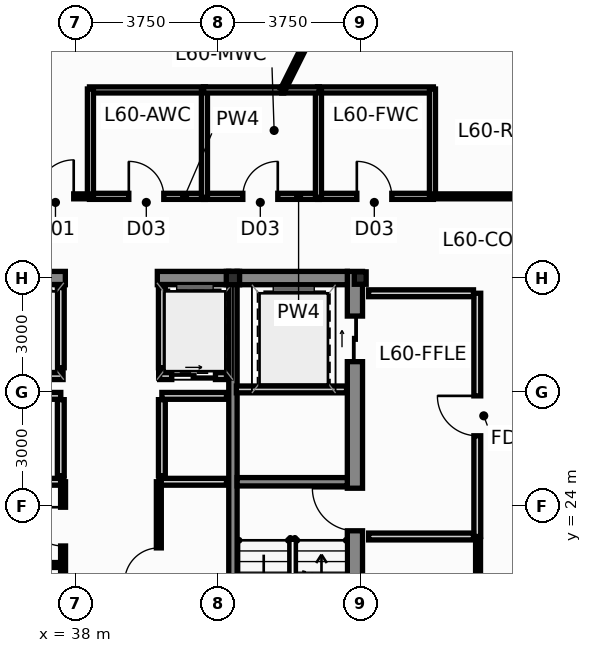
"""IFC4 building model, lengths in metres.
Left out: names, types, materials, properties, quantities, classifications, styles, units other than length and angle.
Written with IfcOpenShell. Run it as: python <this file> out.ifc"""

import sys

from ifc_helpers import new_model, si_unit, direction, frame, frame_2d, origin, origin_2d, place, context, subcontext, project, spatial, rectangle, hollow_rectangle, i_section, extrude, source, transform, mapped, element, fill, save


model = new_model("IFC4")
c1 = context("Model", 3, precision=1e-05, world=origin(), true_north=direction((0.0, 1.0)))
c2 = subcontext(c1, "Body", "Model", "MODEL_VIEW")
j1 = project(units=[si_unit("LENGTHUNIT", "METRE"), si_unit("PLANEANGLEUNIT", "RADIAN")], contexts=[c1])
p1 = place(None, origin())
s1 = spatial("IfcSite", under=j1, at=p1, CompositionType="ELEMENT")
p2 = place(p1, origin())
s2 = spatial("IfcBuilding", under=s1, at=p2, CompositionType="ELEMENT")
p3 = place(p2, frame((0.0, 0.0, 229.85)))
s3 = spatial("IfcBuildingStorey", under=s2, at=p3, CompositionType="ELEMENT", Elevation=229.85)
m1 = source(origin(), c2, "Body", "SweptSolid", [
    extrude(i_section(OverallWidth=0.311, OverallDepth=0.327, WebThickness=0.016, FlangeThickness=0.025, at=origin_2d()), origin(), (0.0, 0.0, 1.0), 3.65),
])
p4 = place(p3, frame((45.5, 30.0, 0.0), z_axis=(0.0, 0.0, 1.0), x_axis=(1.0, 0.0, 0.0)))
e1 = element("IfcColumn", 1, at=p4, inside=s3, PredefinedType="COLUMN", context=c2, shape_type="MappedRepresentation", body=[
    mapped(m1, transform((0.0, 0.0, 0.0), scale=1.0)),
])
m2 = source(origin(), c2, "Body", "SweptSolid", [
    extrude(hollow_rectangle(XDim=0.35, YDim=0.35, WallThickness=0.016, at=origin_2d()), origin(), (0.0, 0.0, 1.0), 3.65),
])
p5 = place(p3, frame((42.15, 30.0, 0.0), z_axis=(0.0, 0.0, 1.0), x_axis=(1.0, 0.0, 0.0)))
e2 = element("IfcColumn", 2, at=p5, inside=s3, PredefinedType="COLUMN", context=c2, shape_type="MappedRepresentation", body=[
    mapped(m2, transform((0.0, 0.0, 0.0), scale=1.0)),
])
p6 = place(p3, frame((45.36, 17.05, 0.0), z_axis=(0.0, 0.0, 1.0), x_axis=(0.0, 1.0, 0.0)))
e3 = element("IfcWall", 3, at=p6, inside=s3, PredefinedType="SHEAR", context=c2, shape_type="SweptSolid", body=[
    extrude(rectangle(XDim=13.125, YDim=0.4, at=frame_2d((6.562, 0.0))), origin(), (0.0, 0.0, 1.0), 3.65),
])
p7 = place(p6, frame((6.3, 0.0, 0.0)))
e4 = element("IfcOpeningElement", 4, at=p7, cuts=e3, PredefinedType="OPENING", context=c2, shape_type="SweptSolid", body=[
    extrude(rectangle(XDim=1.12, YDim=2.15, at=frame_2d((0.56, 1.075))), frame((0.0, 0.212, 0.0), z_axis=(0.0, -1.0, 0.0), x_axis=(1.0, 0.0, 0.0)), (0.0, 0.0, 1.0), 0.424),
])
p8 = place(p6, frame((10.75, 0.0, 0.0)))
e5 = element("IfcOpeningElement", 5, at=p8, cuts=e3, PredefinedType="OPENING", context=c2, shape_type="SweptSolid", body=[
    extrude(rectangle(XDim=1.2, YDim=2.2, at=frame_2d((0.6, 1.1))), frame((0.0, 0.212, 0.0), z_axis=(0.0, -1.0, 0.0), x_axis=(1.0, 0.0, 0.0)), (0.0, 0.0, 1.0), 0.424),
])
p9 = place(p3, frame((33.96, 30.0, 0.0), z_axis=(0.0, 0.0, 1.0), x_axis=(1.0, 0.0, 0.0)))
e6 = element("IfcWall", 6, at=p9, inside=s3, PredefinedType="SHEAR", context=c2, shape_type="SweptSolid", body=[
    extrude(rectangle(XDim=3.78, YDim=0.35, at=frame_2d((1.89, 0.0))), origin(), (0.0, 0.0, 1.0), 3.65),
])
p10 = place(p3, frame((40.16, 30.0, 0.0), z_axis=(0.0, 0.0, 1.0), x_axis=(1.0, 0.0, 0.0)))
e7 = element("IfcWall", 7, at=p10, inside=s3, PredefinedType="SHEAR", context=c2, shape_type="SweptSolid", body=[
    extrude(rectangle(XDim=1.88, YDim=0.35, at=frame_2d((0.94, 0.0))), origin(), (0.0, 0.0, 1.0), 3.65),
])
p11 = place(p3, frame((42.26, 30.0, 0.0), z_axis=(0.0, 0.0, 1.0), x_axis=(1.0, 0.0, 0.0)))
e8 = element("IfcWall", 8, at=p11, inside=s3, PredefinedType="SHEAR", context=c2, shape_type="SweptSolid", body=[
    extrude(rectangle(XDim=2.9, YDim=0.35, at=frame_2d((1.45, 0.0))), origin(), (0.0, 0.0, 1.0), 3.65),
])
p12 = place(p3, frame((42.15, 17.05, 0.0), z_axis=(0.0, 0.0, 1.0), x_axis=(0.0, 1.0, 0.0)))
e9 = element("IfcWall", 9, at=p12, inside=s3, PredefinedType="SHEAR", context=c2, shape_type="SweptSolid", body=[
    extrude(rectangle(XDim=13.125, YDim=0.22, at=frame_2d((6.562, 0.0))), origin(), (0.0, 0.0, 1.0), 3.65),
])
p13 = place(p3, frame((42.26, 24.64, 0.0), z_axis=(0.0, 0.0, 1.0), x_axis=(1.0, 0.0, 0.0)))
e10 = element("IfcWall", 10, at=p13, inside=s3, PredefinedType="SHEAR", context=c2, shape_type="SweptSolid", body=[
    extrude(rectangle(XDim=2.9, YDim=0.22, at=frame_2d((1.45, 0.0))), origin(), (0.0, 0.0, 1.0), 3.65),
])
p14 = place(p3, frame((34.02, 26.9, 0.0), z_axis=(0.0, 0.0, 1.0), x_axis=(1.0, 0.0, 0.0)))
e11 = element("IfcWall", 11, at=p14, inside=s3, PredefinedType="PARTITIONING", context=c2, shape_type="SweptSolid", body=[
    extrude(rectangle(XDim=3.6, YDim=0.18, at=frame_2d((1.8, 0.0))), origin(), (0.0, 0.0, 1.0), 3.4),
])
p15 = place(p3, frame((40.28, 26.9, 0.0), z_axis=(0.0, 0.0, 1.0), x_axis=(1.0, 0.0, 0.0)))
e12 = element("IfcWall", 12, at=p15, inside=s3, PredefinedType="PARTITIONING", context=c2, shape_type="SweptSolid", body=[
    extrude(rectangle(XDim=1.7, YDim=0.18, at=frame_2d((0.85, 0.0))), origin(), (0.0, 0.0, 1.0), 3.4),
])
for number, where, z_axis, x_axis in (
    (13, (37.62, 24.8, 0.0), (0.0, 0.0, 1.0), (0.0, 1.0, 0.0)),
    (14, (40.28, 24.8, 0.0), (0.0, 0.0, 1.0), (0.0, 1.0, 0.0)),
):
    element("IfcWall", number, at=place(p3, frame(where, z_axis=z_axis, x_axis=x_axis)), inside=s3, PredefinedType="PARTITIONING", context=c2, shape_type="SweptSolid", body=[
        extrude(rectangle(XDim=2.0, YDim=0.18, at=frame_2d((1.0, 0.0))), origin(), (0.0, 0.0, 1.0), 3.4),
    ])
p16 = place(p3, frame((34.02, 24.64, 0.0), z_axis=(0.0, 0.0, 1.0), x_axis=(1.0, 0.0, 0.0)))
e15 = element("IfcWall", 15, at=p16, inside=s3, PredefinedType="PARTITIONING", context=c2, shape_type="SweptSolid", body=[
    extrude(rectangle(XDim=3.68, YDim=0.18, at=frame_2d((1.84, 0.0))), origin(), (0.0, 0.0, 1.0), 3.4),
])
p17 = place(p3, frame((40.2, 24.64, 0.0), z_axis=(0.0, 0.0, 1.0), x_axis=(1.0, 0.0, 0.0)))
e16 = element("IfcWall", 16, at=p17, inside=s3, PredefinedType="PARTITIONING", context=c2, shape_type="SweptSolid", body=[
    extrude(rectangle(XDim=1.78, YDim=0.18, at=frame_2d((0.89, 0.0))), origin(), (0.0, 0.0, 1.0), 3.4),
])
p18 = place(p3, frame((34.02, 27.42, 0.0), z_axis=(0.0, 0.0, 1.0), x_axis=(1.0, 0.0, 0.0)))
e17 = element("IfcWall", 17, at=p18, inside=s3, PredefinedType="PARTITIONING", context=c2, shape_type="SweptSolid", body=[
    extrude(rectangle(XDim=3.66, YDim=0.18, at=frame_2d((1.83, 0.0))), origin(), (0.0, 0.0, 1.0), 3.4),
])
p19 = place(p18, frame((0.3, 0.0, 0.0)))
e18 = element("IfcOpeningElement", 18, at=p19, cuts=e17, PredefinedType="OPENING", context=c2, shape_type="SweptSolid", body=[
    extrude(rectangle(XDim=1.15, YDim=2.2, at=frame_2d((0.575, 1.1))), frame((0.0, 0.102, 0.0), z_axis=(0.0, -1.0, 0.0), x_axis=(1.0, 0.0, 0.0)), (0.0, 0.0, 1.0), 0.204),
])
p20 = place(p18, frame((2.1, 0.0, 0.0)))
e19 = element("IfcOpeningElement", 19, at=p20, cuts=e17, PredefinedType="OPENING", context=c2, shape_type="SweptSolid", body=[
    extrude(rectangle(XDim=1.15, YDim=2.2, at=frame_2d((0.575, 1.1))), frame((0.0, 0.102, 0.0), z_axis=(0.0, -1.0, 0.0), x_axis=(1.0, 0.0, 0.0)), (0.0, 0.0, 1.0), 0.204),
])
p21 = place(p3, frame((40.22, 27.42, 0.0), z_axis=(0.0, 0.0, 1.0), x_axis=(1.0, 0.0, 0.0)))
e20 = element("IfcWall", 20, at=p21, inside=s3, PredefinedType="PARTITIONING", context=c2, shape_type="SweptSolid", body=[
    extrude(rectangle(XDim=1.76, YDim=0.18, at=frame_2d((0.88, 0.0))), origin(), (0.0, 0.0, 1.0), 3.4),
])
p22 = place(p21, frame((0.32, 0.0, 0.0)))
e21 = element("IfcOpeningElement", 21, at=p22, cuts=e20, PredefinedType="OPENING", context=c2, shape_type="SweptSolid", body=[
    extrude(rectangle(XDim=1.15, YDim=2.2, at=frame_2d((0.575, 1.1))), frame((0.0, 0.102, 0.0), z_axis=(0.0, -1.0, 0.0), x_axis=(1.0, 0.0, 0.0)), (0.0, 0.0, 1.0), 0.204),
])
for number, where, z_axis, x_axis in (
    (22, (37.62, 27.64, 0.0), (0.0, 0.0, 1.0), (0.0, 1.0, 0.0)),
    (23, (40.28, 27.64, 0.0), (0.0, 0.0, 1.0), (0.0, 1.0, 0.0)),
):
    element("IfcWall", number, at=place(p3, frame(where, z_axis=z_axis, x_axis=x_axis)), inside=s3, PredefinedType="PARTITIONING", context=c2, shape_type="SweptSolid", body=[
        extrude(rectangle(XDim=2.11, YDim=0.18, at=frame_2d((1.055, 0.0))), origin(), (0.0, 0.0, 1.0), 3.4),
    ])
p23 = place(p3, frame((48.58, 23.2, 0.0), z_axis=(0.0, 0.0, 1.0), x_axis=(0.0, 1.0, 0.0)))
e24 = element("IfcWall", 24, at=p23, inside=s3, PredefinedType="PARTITIONING", context=c2, shape_type="SweptSolid", body=[
    extrude(rectangle(XDim=6.4, YDim=0.18, at=frame_2d((3.2, 0.0))), origin(), (0.0, 0.0, 1.0), 3.129),
])
p24 = place(p23, frame((2.65, 0.0, 0.0)))
e25 = element("IfcOpeningElement", 25, at=p24, cuts=e24, PredefinedType="OPENING", context=c2, shape_type="SweptSolid", body=[
    extrude(rectangle(XDim=1.05, YDim=2.15, at=frame_2d((0.525, 1.075))), frame((0.0, 0.102, 0.0), z_axis=(0.0, -1.0, 0.0), x_axis=(1.0, 0.0, 0.0)), (0.0, 0.0, 1.0), 0.204),
])
p25 = place(p3, frame((45.72, 23.2, 0.0), z_axis=(0.0, 0.0, 1.0), x_axis=(1.0, 0.0, 0.0)))
e26 = element("IfcWall", 26, at=p25, inside=s3, PredefinedType="PARTITIONING", context=c2, shape_type="SweptSolid", body=[
    extrude(rectangle(XDim=2.76, YDim=0.18, at=frame_2d((1.38, 0.0))), origin(), (0.0, 0.0, 1.0), 3.4),
])
p26 = place(p3, frame((45.72, 29.6, 0.0), z_axis=(0.0, 0.0, 1.0), x_axis=(1.0, 0.0, 0.0)))
e27 = element("IfcWall", 27, at=p26, inside=s3, PredefinedType="PARTITIONING", context=c2, shape_type="SweptSolid", body=[
    extrude(rectangle(XDim=2.76, YDim=0.18, at=frame_2d((1.38, 0.0))), origin(), (0.0, 0.0, 1.0), 2.985),
])
p27 = place(p3, frame((42.24, 27.07, 0.0), z_axis=(0.0, 0.0, 1.0), x_axis=(1.0, 0.0, 0.0)))
e28 = element("IfcWall", 28, at=p27, inside=s3, PredefinedType="PARTITIONING", context=c2, shape_type="SweptSolid", body=[
    extrude(rectangle(XDim=2.9, YDim=0.18, at=frame_2d((1.45, 0.0))), origin(), (0.0, 0.0, 1.0), 3.4),
])
p28 = place(p3, frame((34.02, 22.45, 0.0), z_axis=(0.0, 0.0, 1.0), x_axis=(1.0, 0.0, 0.0)))
e29 = element("IfcWall", 29, at=p28, inside=s3, PredefinedType="PARTITIONING", context=c2, shape_type="SweptSolid", body=[
    extrude(rectangle(XDim=3.58, YDim=0.13, at=frame_2d((1.79, 0.0))), origin(), (0.0, 0.0, 1.0), 3.4),
])
p29 = place(p3, frame((37.68, 20.5, 0.0), z_axis=(0.0, 0.0, 1.0), x_axis=(0.0, 1.0, 0.0)))
e30 = element("IfcWall", 30, at=p29, inside=s3, PredefinedType="PARTITIONING", context=c2, shape_type="SweptSolid", body=[
    extrude(rectangle(XDim=4.14, YDim=0.13, at=frame_2d((2.07, 0.0))), origin(), (0.0, 0.0, 1.0), 3.4),
])
p30 = place(p29, frame((0.42, 0.0, 0.0)))
e31 = element("IfcOpeningElement", 31, at=p30, cuts=e30, PredefinedType="OPENING", context=c2, shape_type="SweptSolid", body=[
    extrude(rectangle(XDim=0.9, YDim=2.1, at=frame_2d((0.45, 1.05))), frame((0.0, 0.077, 0.0), z_axis=(0.0, -1.0, 0.0), x_axis=(1.0, 0.0, 0.0)), (0.0, 0.0, 1.0), 0.154),
])
p31 = place(p29, frame((2.45, 0.0, 0.0)))
e32 = element("IfcOpeningElement", 32, at=p31, cuts=e30, PredefinedType="OPENING", context=c2, shape_type="SweptSolid", body=[
    extrude(rectangle(XDim=1.02, YDim=2.15, at=frame_2d((0.51, 1.075))), frame((0.0, 0.077, 0.0), z_axis=(0.0, -1.0, 0.0), x_axis=(1.0, 0.0, 0.0)), (0.0, 0.0, 1.0), 0.154),
])
p32 = place(p3, frame((40.2, 20.5, 0.0), z_axis=(0.0, 0.0, 1.0), x_axis=(0.0, 1.0, 0.0)))
e33 = element("IfcWall", 33, at=p32, inside=s3, PredefinedType="PARTITIONING", context=c2, shape_type="SweptSolid", body=[
    extrude(rectangle(XDim=4.14, YDim=0.13, at=frame_2d((2.07, 0.0))), origin(), (0.0, 0.0, 1.0), 3.4),
])
p33 = place(p32, frame((1.5, 0.0, 0.0)))
e34 = element("IfcOpeningElement", 34, at=p33, cuts=e33, PredefinedType="OPENING", context=c2, shape_type="SweptSolid", body=[
    extrude(rectangle(XDim=0.9, YDim=2.1, at=frame_2d((0.45, 1.05))), frame((0.0, 0.077, 0.0), z_axis=(0.0, -1.0, 0.0), x_axis=(1.0, 0.0, 0.0)), (0.0, 0.0, 1.0), 0.154),
])
p34 = place(p3, frame((38.375, 32.15, 0.0), z_axis=(0.0, 0.0, 1.0), x_axis=(1.0, 0.0, 0.0)))
e35 = element("IfcWall", 35, at=p34, inside=s3, PredefinedType="PLUMBINGWALL", context=c2, shape_type="SweptSolid", body=[
    extrude(rectangle(XDim=3.05, YDim=0.16, at=frame_2d((1.525, 0.0))), origin(), (0.0, 0.0, 1.0), 3.4),
])
p35 = place(p34, frame((1.035, 0.0, 0.0)))
e36 = element("IfcOpeningElement", 36, at=p35, cuts=e35, PredefinedType="OPENING", context=c2, shape_type="SweptSolid", body=[
    extrude(rectangle(XDim=0.92, YDim=2.1, at=frame_2d((0.46, 1.05))), frame((0.0, 0.092, 0.0), z_axis=(0.0, -1.0, 0.0), x_axis=(1.0, 0.0, 0.0)), (0.0, 0.0, 1.0), 0.184),
])
p36 = place(p3, frame((41.375, 32.15, 0.0), z_axis=(0.0, 0.0, 1.0), x_axis=(1.0, 0.0, 0.0)))
e37 = element("IfcWall", 37, at=p36, inside=s3, PredefinedType="PLUMBINGWALL", context=c2, shape_type="SweptSolid", body=[
    extrude(rectangle(XDim=3.05, YDim=0.16, at=frame_2d((1.525, 0.0))), origin(), (0.0, 0.0, 1.0), 3.4),
])
p37 = place(p36, frame((1.035, 0.0, 0.0)))
e38 = element("IfcOpeningElement", 38, at=p37, cuts=e37, PredefinedType="OPENING", context=c2, shape_type="SweptSolid", body=[
    extrude(rectangle(XDim=0.92, YDim=2.1, at=frame_2d((0.46, 1.05))), frame((0.0, 0.092, 0.0), z_axis=(0.0, -1.0, 0.0), x_axis=(1.0, 0.0, 0.0)), (0.0, 0.0, 1.0), 0.184),
])
p38 = place(p3, frame((44.375, 32.15, 0.0), z_axis=(0.0, 0.0, 1.0), x_axis=(1.0, 0.0, 0.0)))
e39 = element("IfcWall", 39, at=p38, inside=s3, PredefinedType="PLUMBINGWALL", context=c2, shape_type="SweptSolid", body=[
    extrude(rectangle(XDim=3.05, YDim=0.16, at=frame_2d((1.525, 0.0))), origin(), (0.0, 0.0, 1.0), 3.4),
])
p39 = place(p38, frame((1.035, 0.0, 0.0)))
e40 = element("IfcOpeningElement", 40, at=p39, cuts=e39, PredefinedType="OPENING", context=c2, shape_type="SweptSolid", body=[
    extrude(rectangle(XDim=0.92, YDim=2.1, at=frame_2d((0.46, 1.05))), frame((0.0, 0.092, 0.0), z_axis=(0.0, -1.0, 0.0), x_axis=(1.0, 0.0, 0.0)), (0.0, 0.0, 1.0), 0.184),
])
for number, where, z_axis, x_axis in (
    (41, (38.375, 34.95, 0.0), (0.0, 0.0, 1.0), (1.0, 0.0, 0.0)),
    (42, (47.425, 34.95, 0.0), (0.0, 0.0, 1.0), (-1.0, 0.0, 0.0)),
):
    element("IfcWall", number, at=place(p3, frame(where, z_axis=z_axis, x_axis=x_axis)), inside=s3, PredefinedType="PLUMBINGWALL", context=c2, shape_type="SweptSolid", body=[
        extrude(rectangle(XDim=3.05, YDim=0.16, at=frame_2d((1.525, 0.0))), origin(), (0.0, 0.0, 1.0), 3.4),
    ])
for number, where, z_axis, x_axis in (
    (43, (41.4, 32.125, 0.0), (0.0, 0.0, 1.0), (0.0, 1.0, 0.0)),
    (44, (38.4, 32.125, 0.0), (0.0, 0.0, 1.0), (0.0, 1.0, 0.0)),
):
    element("IfcWall", number, at=place(p3, frame(where, z_axis=z_axis, x_axis=x_axis)), inside=s3, PredefinedType="PLUMBINGWALL", context=c2, shape_type="SweptSolid", body=[
        extrude(rectangle(XDim=2.85, YDim=0.16, at=frame_2d((1.425, 0.0))), origin(), (0.0, 0.0, 1.0), 3.4),
    ])
for number, where, z_axis, x_axis in (
    (45, (44.4, 32.125, 0.0), (0.0, 0.0, 1.0), (0.0, 1.0, 0.0)),
    (46, (47.4, 32.125, 0.0), (0.0, 0.0, 1.0), (0.0, 1.0, 0.0)),
):
    element("IfcWall", number, at=place(p3, frame(where, z_axis=z_axis, x_axis=x_axis)), inside=s3, PredefinedType="PLUMBINGWALL", context=c2, shape_type="SweptSolid", body=[
        extrude(rectangle(XDim=2.85, YDim=0.16, at=frame_2d((1.425, 0.0))), origin(), (0.0, 0.0, 1.0), 2.985),
    ])
p40 = place(p3, frame((41.375, 34.95, 0.0), z_axis=(0.0, 0.0, 1.0), x_axis=(1.0, 0.0, 0.0)))
e47 = element("IfcWall", 47, at=p40, inside=s3, PredefinedType="PLUMBINGWALL", context=c2, shape_type="SweptSolid", body=[
    extrude(rectangle(XDim=2.11, YDim=0.16, at=frame_2d((1.055, 0.0))), origin(), (0.0, 0.0, 1.0), 3.4),
])
p41 = place(p3, frame((43.435, 34.95, 0.0), z_axis=(0.0, 0.0, 1.0), x_axis=(1.0, 0.0, 0.0)))
e48 = element("IfcWall", 48, at=p41, inside=s3, PredefinedType="PLUMBINGWALL", context=c2, shape_type="SweptSolid", body=[
    extrude(rectangle(XDim=0.99, YDim=0.16, at=frame_2d((0.495, 0.0))), origin(), (0.0, 0.0, 1.0), 3.4),
])
p42 = place(p3, frame((43.462, 34.954, 0.0), z_axis=(0.0, 0.0, 1.0), x_axis=(0.446662598545, 0.894702477398, 0.0)))
e49 = element("IfcWall", 49, at=p42, inside=s3, PredefinedType="PARTITIONING", context=c2, shape_type="SweptSolid", body=[
    extrude(rectangle(XDim=6.913, YDim=0.13, at=frame_2d((3.457, 0.0))), origin(), (0.0, 0.0, 1.0), 3.4),
])
p43 = place(p3, frame((48.6, 17.105, 0.0), z_axis=(0.0, 0.0, 1.0), x_axis=(0.0, 1.0, 0.0)))
e50 = element("IfcWall", 50, at=p43, inside=s3, PredefinedType="PARTITIONING", context=c2, shape_type="SweptSolid", body=[
    extrude(rectangle(XDim=6.0, YDim=0.13, at=frame_2d((3.0, 0.0))), origin(), (0.0, 0.0, 1.0), 3.4),
])
p44 = place(p43, frame((2.52, 0.0, 0.0)))
e51 = element("IfcOpeningElement", 51, at=p44, cuts=e50, PredefinedType="OPENING", context=c2, shape_type="SweptSolid", body=[
    extrude(rectangle(XDim=0.96, YDim=2.15, at=frame_2d((0.48, 1.075))), frame((0.0, 0.077, 0.0), z_axis=(0.0, -1.0, 0.0), x_axis=(1.0, 0.0, 0.0)), (0.0, 0.0, 1.0), 0.154),
])
p45 = place(p3, frame((50.595, 32.15, 0.0), z_axis=(0.0, 0.0, 1.0), x_axis=(-1.0, 0.0, 0.0)))
e52 = element("IfcWall", 52, at=p45, inside=s3, PredefinedType="PARTITIONING", context=c2, shape_type="SweptSolid", body=[
    extrude(rectangle(XDim=3.19, YDim=0.13, at=frame_2d((1.595, 0.0))), origin(), (0.0, 0.0, 1.0), 3.4),
])
p46 = place(p3, frame((36.565, 32.15, 0.0), z_axis=(0.0, 0.0, 1.0), x_axis=(1.0, 0.0, 0.0)))
e53 = element("IfcWall", 53, at=p46, inside=s3, PredefinedType="PARTITIONING", context=c2, shape_type="SweptSolid", body=[
    extrude(rectangle(XDim=1.83, YDim=0.13, at=frame_2d((0.915, 0.0))), origin(), (0.0, 0.0, 1.0), 3.4),
])
p47 = place(p46, frame((0.435, 0.0, 0.0)))
e54 = element("IfcOpeningElement", 54, at=p47, cuts=e53, PredefinedType="OPENING", context=c2, shape_type="SweptSolid", body=[
    extrude(rectangle(XDim=0.96, YDim=2.15, at=frame_2d((0.48, 1.075))), frame((0.0, 0.077, 0.0), z_axis=(0.0, -1.0, 0.0), x_axis=(1.0, 0.0, 0.0)), (0.0, 0.0, 1.0), 0.154),
])
p48 = place(p7, origin())
e55 = element("IfcDoor", 55, at=p48, inside=s3, OperationType="SINGLE_SWING_RIGHT", PredefinedType="DOOR", context=c2, shape_type="SweptSolid", body=[
    extrude(rectangle(XDim=1.12, YDim=2.15, at=frame_2d((0.56, 1.075))), frame((0.0, 0.025, 0.0), z_axis=(0.0, -1.0, 0.0), x_axis=(1.0, 0.0, 0.0)), (0.0, 0.0, 1.0), 0.05),
])
fill(e4, e55)
p49 = place(p8, origin())
e56 = element("IfcDoor", 56, at=p49, inside=s3, OperationType="SLIDING_TO_RIGHT", PredefinedType="DOOR", context=c2, shape_type="SweptSolid", body=[
    extrude(rectangle(XDim=1.2, YDim=2.2, at=frame_2d((0.6, 1.1))), frame((0.0, 0.025, 0.0), z_axis=(0.0, -1.0, 0.0), x_axis=(1.0, 0.0, 0.0)), (0.0, 0.0, 1.0), 0.05),
])
fill(e5, e56)
p50 = place(p22, origin())
e57 = element("IfcDoor", 57, at=p50, inside=s3, OperationType="SLIDING_TO_RIGHT", PredefinedType="DOOR", context=c2, shape_type="SweptSolid", body=[
    extrude(rectangle(XDim=1.15, YDim=2.2, at=frame_2d((0.575, 1.1))), frame((0.0, 0.025, 0.0), z_axis=(0.0, -1.0, 0.0), x_axis=(1.0, 0.0, 0.0)), (0.0, 0.0, 1.0), 0.05),
])
fill(e21, e57)
p51 = place(p24, origin())
e58 = element("IfcDoor", 58, at=p51, inside=s3, OperationType="SINGLE_SWING_RIGHT", PredefinedType="DOOR", context=c2, shape_type="SweptSolid", body=[
    extrude(rectangle(XDim=1.05, YDim=2.15, at=frame_2d((0.525, 1.075))), frame((0.0, 0.025, 0.0), z_axis=(0.0, -1.0, 0.0), x_axis=(1.0, 0.0, 0.0)), (0.0, 0.0, 1.0), 0.05),
])
fill(e25, e58)
p52 = place(p31, origin())
e59 = element("IfcDoor", 59, at=p52, inside=s3, OperationType="SINGLE_SWING_RIGHT", PredefinedType="DOOR", context=c2, shape_type="SweptSolid", body=[
    extrude(rectangle(XDim=1.02, YDim=2.15, at=frame_2d((0.51, 1.075))), frame((0.0, 0.025, 0.0), z_axis=(0.0, -1.0, 0.0), x_axis=(1.0, 0.0, 0.0)), (0.0, 0.0, 1.0), 0.05),
])
fill(e32, e59)
p53 = place(p33, origin())
e60 = element("IfcDoor", 60, at=p53, inside=s3, OperationType="SINGLE_SWING_LEFT", PredefinedType="DOOR", context=c2, shape_type="SweptSolid", body=[
    extrude(rectangle(XDim=0.9, YDim=2.1, at=frame_2d((0.45, 1.05))), frame((0.0, 0.025, 0.0), z_axis=(0.0, -1.0, 0.0), x_axis=(1.0, 0.0, 0.0)), (0.0, 0.0, 1.0), 0.05),
])
fill(e34, e60)
p54 = place(p35, origin())
e61 = element("IfcDoor", 61, at=p54, inside=s3, OperationType="SINGLE_SWING_LEFT", PredefinedType="DOOR", context=c2, shape_type="SweptSolid", body=[
    extrude(rectangle(XDim=0.92, YDim=2.1, at=frame_2d((0.46, 1.05))), frame((0.0, 0.025, 0.0), z_axis=(0.0, -1.0, 0.0), x_axis=(1.0, 0.0, 0.0)), (0.0, 0.0, 1.0), 0.05),
])
fill(e36, e61)
p55 = place(p37, origin())
e62 = element("IfcDoor", 62, at=p55, inside=s3, OperationType="SINGLE_SWING_RIGHT", PredefinedType="DOOR", context=c2, shape_type="SweptSolid", body=[
    extrude(rectangle(XDim=0.92, YDim=2.1, at=frame_2d((0.46, 1.05))), frame((0.0, 0.025, 0.0), z_axis=(0.0, -1.0, 0.0), x_axis=(1.0, 0.0, 0.0)), (0.0, 0.0, 1.0), 0.05),
])
fill(e38, e62)
p56 = place(p39, origin())
e63 = element("IfcDoor", 63, at=p56, inside=s3, OperationType="SINGLE_SWING_LEFT", PredefinedType="DOOR", context=c2, shape_type="SweptSolid", body=[
    extrude(rectangle(XDim=0.92, YDim=2.1, at=frame_2d((0.46, 1.05))), frame((0.0, 0.025, 0.0), z_axis=(0.0, -1.0, 0.0), x_axis=(1.0, 0.0, 0.0)), (0.0, 0.0, 1.0), 0.05),
])
fill(e40, e63)
p57 = place(p47, origin())
e64 = element("IfcDoor", 64, at=p57, inside=s3, OperationType="SINGLE_SWING_RIGHT", PredefinedType="DOOR", context=c2, shape_type="SweptSolid", body=[
    extrude(rectangle(XDim=0.96, YDim=2.15, at=frame_2d((0.48, 1.075))), frame((0.0, 0.025, 0.0), z_axis=(0.0, -1.0, 0.0), x_axis=(1.0, 0.0, 0.0)), (0.0, 0.0, 1.0), 0.05),
])
fill(e54, e64)
save(model, sys.argv[1])
